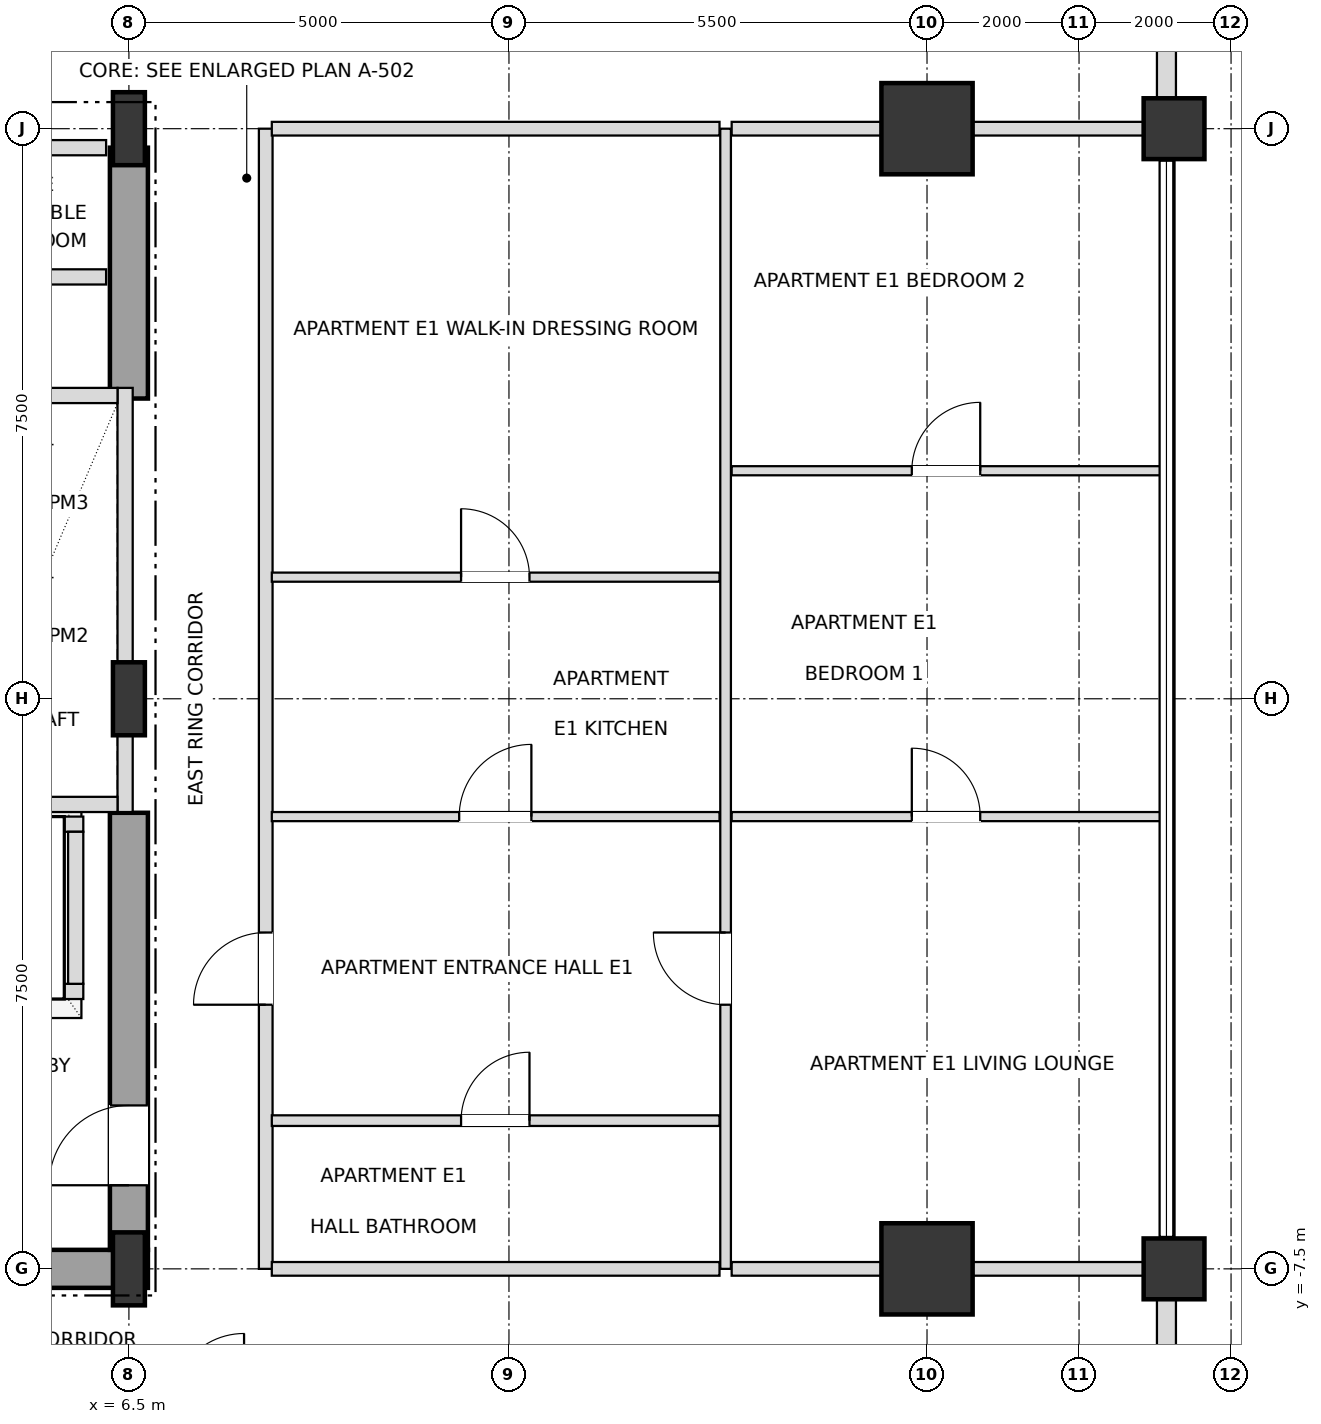
"""IFC4 building model, lengths in metres.
Left out: names, types, materials, properties, quantities, classifications, styles, units other than length and angle.
Written with IfcOpenShell. Run it as: python <this file> out.ifc"""

import sys

from ifc_helpers import new_model, si_unit, direction, frame, frame_2d, origin, origin_2d, place, context, subcontext, project, spatial, rectangle, i_section, extrude, element, fill, save


model = new_model("IFC4")
c1 = context("Model", 3, precision=1e-05, world=origin(), true_north=direction((0.0, 1.0)))
c2 = subcontext(c1, "Body", "Model", "MODEL_VIEW")
j1 = project(units=[si_unit("LENGTHUNIT", "METRE"), si_unit("PLANEANGLEUNIT", "RADIAN")], contexts=[c1])
p1 = place(None, origin())
s1 = spatial("IfcSite", under=j1, at=p1, CompositionType="ELEMENT")
p2 = place(p1, origin())
s2 = spatial("IfcBuilding", under=s1, at=p2, CompositionType="ELEMENT")
p3 = place(p2, frame((0.0, 0.0, 117.0)))
s3 = spatial("IfcBuildingStorey", under=s2, at=p3, CompositionType="ELEMENT", Elevation=117.0)
for number, where, z_axis, x_axis in (
    (1, (6.5, -7.5, 0.0), (0.0, 0.0, 1.0), (1.0, 0.0, 0.0)),
    (2, (6.5, 0.0, 0.0), (0.0, 0.0, 1.0), (1.0, 0.0, 0.0)),
    (3, (6.5, 7.5, 0.0), (0.0, 0.0, 1.0), (1.0, 0.0, 0.0)),
):
    element("IfcColumn", number, at=place(p3, frame(where, z_axis=z_axis, x_axis=x_axis)), inside=s3, PredefinedType="COLUMN", context=c2, shape_type="SweptSolid", body=[
        extrude(i_section(OverallWidth=0.42, OverallDepth=0.96, WebThickness=0.022, FlangeThickness=0.034, at=origin_2d()), origin(), (0.0, 0.0, 1.0), 3.6),
    ])
for number, where, z_axis, x_axis in (
    (4, (17.0, -7.5, 0.0), (0.0, 0.0, 1.0), (1.0, 0.0, 0.0)),
    (5, (17.0, 7.5, 0.0), (0.0, 0.0, 1.0), (1.0, 0.0, 0.0)),
):
    element("IfcColumn", number, at=place(p3, frame(where, z_axis=z_axis, x_axis=x_axis)), inside=s3, PredefinedType="USERDEFINED", context=c2, shape_type="SweptSolid", body=[
        extrude(rectangle(XDim=1.2, YDim=1.2, at=origin_2d()), origin(), (0.0, 0.0, 1.0), 3.6),
    ])
for number, where, z_axis, x_axis in (
    (6, (20.25, -7.5, 0.0), (0.0, 0.0, 1.0), (1.0, 0.0, 0.0)),
    (7, (20.25, 7.5, 0.0), (0.0, 0.0, 1.0), (1.0, 0.0, 0.0)),
):
    element("IfcColumn", number, at=place(p3, frame(where, z_axis=z_axis, x_axis=x_axis)), inside=s3, PredefinedType="COLUMN", context=c2, shape_type="SweptSolid", body=[
        extrude(rectangle(XDim=0.8, YDim=0.8, at=origin_2d()), origin(), (0.0, 0.0, 1.0), 3.6),
    ])
p4 = place(p3, frame((20.15, -12.605, 0.0), z_axis=(0.0, 0.0, 1.0), x_axis=(0.0, 1.0, 0.0)))
e8 = element("IfcWall", 8, at=p4, inside=s3, PredefinedType="SOLIDWALL", context=c2, shape_type="SweptSolid", body=[
    extrude(rectangle(XDim=4.71, YDim=0.25, at=frame_2d((2.355, 0.0))), origin(), (0.0, 0.0, 1.0), 2.656),
])
p5 = place(p4, frame((1.455, 0.0, 0.72)))
e9 = element("IfcOpeningElement", 9, at=p5, cuts=e8, PredefinedType="OPENING", context=c2, shape_type="SweptSolid", body=[
    extrude(rectangle(XDim=1.8, YDim=1.68, at=frame_2d((0.9, 0.84))), frame((0.0, 0.135, 0.0), z_axis=(0.0, -1.0, 0.0), x_axis=(1.0, 0.0, 0.0)), (0.0, 0.0, 1.0), 0.27),
])
p6 = place(p3, frame((20.15, 7.895, 0.0), z_axis=(0.0, 0.0, 1.0), x_axis=(0.0, 1.0, 0.0)))
e10 = element("IfcWall", 10, at=p6, inside=s3, PredefinedType="SOLIDWALL", context=c2, shape_type="SweptSolid", body=[
    extrude(rectangle(XDim=4.71, YDim=0.25, at=frame_2d((2.355, 0.0))), origin(), (0.0, 0.0, 1.0), 2.656),
])
p7 = place(p6, frame((1.455, 0.0, 0.72)))
e11 = element("IfcOpeningElement", 11, at=p7, cuts=e10, PredefinedType="OPENING", context=c2, shape_type="SweptSolid", body=[
    extrude(rectangle(XDim=1.8, YDim=1.68, at=frame_2d((0.9, 0.84))), frame((0.0, 0.135, 0.0), z_axis=(0.0, -1.0, 0.0), x_axis=(1.0, 0.0, 0.0)), (0.0, 0.0, 1.0), 0.27),
])
p8 = place(p3, frame((0.0, -7.5, 0.0), z_axis=(0.0, 0.0, 1.0), x_axis=(1.0, 0.0, 0.0)))
e12 = element("IfcWall", 12, at=p8, inside=s3, PredefinedType="SHEAR", context=c2, shape_type="SweptSolid", body=[
    extrude(rectangle(XDim=6.75, YDim=0.5, at=frame_2d((3.375, 0.0))), origin(), (0.0, 0.0, 1.0), 3.3),
])
p9 = place(p3, frame((6.5, -7.25, 0.0), z_axis=(0.0, 0.0, 1.0), x_axis=(0.0, 1.0, 0.0)))
e13 = element("IfcWall", 13, at=p9, inside=s3, PredefinedType="SHEAR", context=c2, shape_type="SweptSolid", body=[
    extrude(rectangle(XDim=5.75, YDim=0.5, at=frame_2d((2.875, 0.0))), origin(), (0.0, 0.0, 1.0), 3.3),
])
p10 = place(p9, frame((0.85, 0.0, 0.0)))
e14 = element("IfcOpeningElement", 14, at=p10, cuts=e13, PredefinedType="OPENING", context=c2, shape_type="SweptSolid", body=[
    extrude(rectangle(XDim=1.05, YDim=2.15, at=frame_2d((0.525, 1.075))), frame((0.0, 0.26, 0.0), z_axis=(0.0, -1.0, 0.0), x_axis=(1.0, 0.0, 0.0)), (0.0, 0.0, 1.0), 0.52),
])
p11 = place(p3, frame((6.5, 3.95, 0.0), z_axis=(0.0, 0.0, 1.0), x_axis=(0.0, 1.0, 0.0)))
e15 = element("IfcWall", 15, at=p11, inside=s3, PredefinedType="SHEAR", context=c2, shape_type="SweptSolid", body=[
    extrude(rectangle(XDim=3.3, YDim=0.5, at=frame_2d((1.65, 0.0))), origin(), (0.0, 0.0, 1.0), 3.3),
])
p12 = place(p3, frame((6.45, -1.49, 0.0), z_axis=(0.0, 0.0, 1.0), x_axis=(0.0, 1.0, 0.0)))
e16 = element("IfcWall", 16, at=p12, inside=s3, PredefinedType="SOLIDWALL", context=c2, shape_type="SweptSolid", body=[
    extrude(rectangle(XDim=5.58, YDim=0.2, at=frame_2d((2.79, 0.0))), origin(), (0.0, 0.0, 1.0), 2.736),
])
for number, where, z_axis, x_axis in (
    (17, (4.15, -1.39, 0.0), (0.0, 0.0, 1.0), (1.0, 0.0, 0.0)),
    (18, (4.15, 3.99, 0.0), (0.0, 0.0, 1.0), (1.0, 0.0, 0.0)),
):
    element("IfcWall", number, at=place(p3, frame(where, z_axis=z_axis, x_axis=x_axis)), inside=s3, PredefinedType="SOLIDWALL", context=c2, shape_type="SweptSolid", body=[
        extrude(rectangle(XDim=2.2, YDim=0.2, at=frame_2d((1.1, 0.0))), origin(), (0.0, 0.0, 1.0), 3.3),
    ])
p13 = place(p3, frame((1.8, -3.85, 0.0), z_axis=(0.0, 0.0, 1.0), x_axis=(1.0, 0.0, 0.0)))
e19 = element("IfcWall", 19, at=p13, inside=s3, PredefinedType="SOLIDWALL", context=c2, shape_type="SweptSolid", body=[
    extrude(rectangle(XDim=4.1, YDim=0.2, at=frame_2d((2.05, 0.0))), origin(), (0.0, 0.0, 1.0), 3.3),
])
p14 = place(p13, frame((0.45, 0.0, 0.0)))
e20 = element("IfcOpeningElement", 20, at=p14, cuts=e19, PredefinedType="OPENING", context=c2, shape_type="SweptSolid", body=[
    extrude(rectangle(XDim=1.2, YDim=2.2, at=frame_2d((0.6, 1.1))), frame((0.0, 0.11, 0.0), z_axis=(0.0, -1.0, 0.0), x_axis=(1.0, 0.0, 0.0)), (0.0, 0.0, 1.0), 0.22),
])
p15 = place(p13, frame((2.45, 0.0, 0.0)))
e21 = element("IfcOpeningElement", 21, at=p15, cuts=e19, PredefinedType="OPENING", context=c2, shape_type="SweptSolid", body=[
    extrude(rectangle(XDim=1.2, YDim=2.2, at=frame_2d((0.6, 1.1))), frame((0.0, 0.11, 0.0), z_axis=(0.0, -1.0, 0.0), x_axis=(1.0, 0.0, 0.0)), (0.0, 0.0, 1.0), 0.22),
])
p16 = place(p3, frame((1.8, -1.65, 0.0), z_axis=(0.0, 0.0, 1.0), x_axis=(1.0, 0.0, 0.0)))
e22 = element("IfcWall", 22, at=p16, inside=s3, PredefinedType="SOLIDWALL", context=c2, shape_type="SweptSolid", body=[
    extrude(rectangle(XDim=4.1, YDim=0.2, at=frame_2d((2.05, 0.0))), origin(), (0.0, 0.0, 1.0), 3.3),
])
p17 = place(p3, frame((5.8, -3.75, 0.0), z_axis=(0.0, 0.0, 1.0), x_axis=(0.0, 1.0, 0.0)))
e23 = element("IfcWall", 23, at=p17, inside=s3, PredefinedType="SOLIDWALL", context=c2, shape_type="SweptSolid", body=[
    extrude(rectangle(XDim=2.0, YDim=0.2, at=frame_2d((1.0, 0.0))), origin(), (0.0, 0.0, 1.0), 3.3),
])
p18 = place(p3, frame((8.3, -7.5, 0.0), z_axis=(0.0, 0.0, 1.0), x_axis=(0.0, 1.0, 0.0)))
e24 = element("IfcWall", 24, at=p18, inside=s3, PredefinedType="PARTITIONING", context=c2, shape_type="SweptSolid", body=[
    extrude(rectangle(XDim=15.0, YDim=0.18, at=frame_2d((7.5, 0.0))), origin(), (0.0, 0.0, 1.0), 3.3),
])
p19 = place(p18, frame((3.475, 0.0, 0.0)))
e25 = element("IfcOpeningElement", 25, at=p19, cuts=e24, PredefinedType="OPENING", context=c2, shape_type="SweptSolid", body=[
    extrude(rectangle(XDim=0.95, YDim=2.15, at=frame_2d((0.475, 1.075))), frame((0.0, 0.1, 0.0), z_axis=(0.0, -1.0, 0.0), x_axis=(1.0, 0.0, 0.0)), (0.0, 0.0, 1.0), 0.2),
])
p20 = place(p3, frame((14.35, -7.5, 0.0), z_axis=(0.0, 0.0, 1.0), x_axis=(0.0, 1.0, 0.0)))
e26 = element("IfcWall", 26, at=p20, inside=s3, PredefinedType="PARTITIONING", context=c2, shape_type="SweptSolid", body=[
    extrude(rectangle(XDim=15.0, YDim=0.14, at=frame_2d((7.5, 0.0))), origin(), (0.0, 0.0, 1.0), 3.3),
])
p21 = place(p20, frame((3.475, 0.0, 0.0)))
e27 = element("IfcOpeningElement", 27, at=p21, cuts=e26, PredefinedType="OPENING", context=c2, shape_type="SweptSolid", body=[
    extrude(rectangle(XDim=0.95, YDim=2.1, at=frame_2d((0.475, 1.05))), frame((0.0, 0.08, 0.0), z_axis=(0.0, -1.0, 0.0), x_axis=(1.0, 0.0, 0.0)), (0.0, 0.0, 1.0), 0.16),
])
p22 = place(p3, frame((8.38, -7.5, 0.0), z_axis=(0.0, 0.0, 1.0), x_axis=(1.0, 0.0, 0.0)))
e28 = element("IfcWall", 28, at=p22, inside=s3, PredefinedType="PARTITIONING", context=c2, shape_type="SweptSolid", body=[
    extrude(rectangle(XDim=5.89, YDim=0.18, at=frame_2d((2.945, 0.0))), origin(), (0.0, 0.0, 1.0), 2.736),
])
p23 = place(p3, frame((14.43, -7.5, 0.0), z_axis=(0.0, 0.0, 1.0), x_axis=(1.0, 0.0, 0.0)))
e29 = element("IfcWall", 29, at=p23, inside=s3, PredefinedType="PARTITIONING", context=c2, shape_type="SweptSolid", body=[
    extrude(rectangle(XDim=5.72, YDim=0.18, at=frame_2d((2.86, 0.0))), origin(), (0.0, 0.0, 1.0), 2.736),
])
p24 = place(p3, frame((8.38, -5.55, 0.0), z_axis=(0.0, 0.0, 1.0), x_axis=(1.0, 0.0, 0.0)))
e30 = element("IfcWall", 30, at=p24, inside=s3, PredefinedType="PARTITIONING", context=c2, shape_type="SweptSolid", body=[
    extrude(rectangle(XDim=5.89, YDim=0.14, at=frame_2d((2.945, 0.0))), origin(), (0.0, 0.0, 1.0), 3.3),
])
p25 = place(p24, frame((2.49, 0.0, 0.0)))
e31 = element("IfcOpeningElement", 31, at=p25, cuts=e30, PredefinedType="OPENING", context=c2, shape_type="SweptSolid", body=[
    extrude(rectangle(XDim=0.9, YDim=2.1, at=frame_2d((0.45, 1.05))), frame((0.0, 0.08, 0.0), z_axis=(0.0, -1.0, 0.0), x_axis=(1.0, 0.0, 0.0)), (0.0, 0.0, 1.0), 0.16),
])
p26 = place(p3, frame((8.38, -1.55, 0.0), z_axis=(0.0, 0.0, 1.0), x_axis=(1.0, 0.0, 0.0)))
e32 = element("IfcWall", 32, at=p26, inside=s3, PredefinedType="PARTITIONING", context=c2, shape_type="SweptSolid", body=[
    extrude(rectangle(XDim=5.89, YDim=0.12, at=frame_2d((2.945, 0.0))), origin(), (0.0, 0.0, 1.0), 3.3),
])
p27 = place(p26, frame((2.465, 0.0, 0.0)))
e33 = element("IfcOpeningElement", 33, at=p27, cuts=e32, PredefinedType="OPENING", context=c2, shape_type="SweptSolid", body=[
    extrude(rectangle(XDim=0.95, YDim=2.1, at=frame_2d((0.475, 1.05))), frame((0.0, 0.07, 0.0), z_axis=(0.0, -1.0, 0.0), x_axis=(1.0, 0.0, 0.0)), (0.0, 0.0, 1.0), 0.14),
])
p28 = place(p3, frame((14.43, -1.55, 0.0), z_axis=(0.0, 0.0, 1.0), x_axis=(1.0, 0.0, 0.0)))
e34 = element("IfcWall", 34, at=p28, inside=s3, PredefinedType="PARTITIONING", context=c2, shape_type="SweptSolid", body=[
    extrude(rectangle(XDim=5.64, YDim=0.12, at=frame_2d((2.82, 0.0))), origin(), (0.0, 0.0, 1.0), 2.736),
])
p29 = place(p28, frame((2.37, 0.0, 0.0)))
e35 = element("IfcOpeningElement", 35, at=p29, cuts=e34, PredefinedType="OPENING", context=c2, shape_type="SweptSolid", body=[
    extrude(rectangle(XDim=0.9, YDim=2.1, at=frame_2d((0.45, 1.05))), frame((0.0, 0.07, 0.0), z_axis=(0.0, -1.0, 0.0), x_axis=(1.0, 0.0, 0.0)), (0.0, 0.0, 1.0), 0.14),
])
p30 = place(p3, frame((8.38, 1.6, 0.0), z_axis=(0.0, 0.0, 1.0), x_axis=(1.0, 0.0, 0.0)))
e36 = element("IfcWall", 36, at=p30, inside=s3, PredefinedType="PARTITIONING", context=c2, shape_type="SweptSolid", body=[
    extrude(rectangle(XDim=5.89, YDim=0.12, at=frame_2d((2.945, 0.0))), origin(), (0.0, 0.0, 1.0), 3.3),
])
p31 = place(p30, frame((2.49, 0.0, 0.0)))
e37 = element("IfcOpeningElement", 37, at=p31, cuts=e36, PredefinedType="OPENING", context=c2, shape_type="SweptSolid", body=[
    extrude(rectangle(XDim=0.9, YDim=2.1, at=frame_2d((0.45, 1.05))), frame((0.0, 0.07, 0.0), z_axis=(0.0, -1.0, 0.0), x_axis=(1.0, 0.0, 0.0)), (0.0, 0.0, 1.0), 0.14),
])
p32 = place(p3, frame((14.43, 3.0, 0.0), z_axis=(0.0, 0.0, 1.0), x_axis=(1.0, 0.0, 0.0)))
e38 = element("IfcWall", 38, at=p32, inside=s3, PredefinedType="PARTITIONING", context=c2, shape_type="SweptSolid", body=[
    extrude(rectangle(XDim=5.64, YDim=0.12, at=frame_2d((2.82, 0.0))), origin(), (0.0, 0.0, 1.0), 2.736),
])
p33 = place(p32, frame((2.37, 0.0, 0.0)))
e39 = element("IfcOpeningElement", 39, at=p33, cuts=e38, PredefinedType="OPENING", context=c2, shape_type="SweptSolid", body=[
    extrude(rectangle(XDim=0.9, YDim=2.1, at=frame_2d((0.45, 1.05))), frame((0.0, 0.07, 0.0), z_axis=(0.0, -1.0, 0.0), x_axis=(1.0, 0.0, 0.0)), (0.0, 0.0, 1.0), 0.14),
])
for number, where, z_axis, x_axis in (
    (40, (4.13, 5.55, 0.0), (0.0, 0.0, 1.0), (1.0, 0.0, 0.0)),
    (41, (4.13, 7.25, 0.0), (0.0, 0.0, 1.0), (1.0, 0.0, 0.0)),
):
    element("IfcWall", number, at=place(p3, frame(where, z_axis=z_axis, x_axis=x_axis)), inside=s3, PredefinedType="SOLIDWALL", context=c2, shape_type="SweptSolid", body=[
        extrude(rectangle(XDim=2.07, YDim=0.2, at=frame_2d((1.035, 0.0))), origin(), (0.0, 0.0, 1.0), 3.3),
    ])
p34 = place(p3, frame((8.38, 7.5, 0.0), z_axis=(0.0, 0.0, 1.0), x_axis=(1.0, 0.0, 0.0)))
e42 = element("IfcWall", 42, at=p34, inside=s3, PredefinedType="PARTITIONING", context=c2, shape_type="SweptSolid", body=[
    extrude(rectangle(XDim=5.89, YDim=0.18, at=frame_2d((2.945, 0.0))), origin(), (0.0, 0.0, 1.0), 2.736),
])
p35 = place(p3, frame((14.43, 7.5, 0.0), z_axis=(0.0, 0.0, 1.0), x_axis=(1.0, 0.0, 0.0)))
e43 = element("IfcWall", 43, at=p35, inside=s3, PredefinedType="PARTITIONING", context=c2, shape_type="SweptSolid", body=[
    extrude(rectangle(XDim=5.72, YDim=0.18, at=frame_2d((2.86, 0.0))), origin(), (0.0, 0.0, 1.0), 2.736),
])
p36 = place(p10, origin())
e44 = element("IfcDoor", 44, at=p36, inside=s3, OperationType="SINGLE_SWING_LEFT", PredefinedType="DOOR", context=c2, shape_type="SweptSolid", body=[
    extrude(rectangle(XDim=1.05, YDim=2.15, at=frame_2d((0.525, 1.075))), frame((0.0, 0.025, 0.0), z_axis=(0.0, -1.0, 0.0), x_axis=(1.0, 0.0, 0.0)), (0.0, 0.0, 1.0), 0.05),
])
fill(e14, e44)
p37 = place(p25, origin())
e45 = element("IfcDoor", 45, at=p37, inside=s3, OperationType="SINGLE_SWING_RIGHT", PredefinedType="DOOR", context=c2, shape_type="SweptSolid", body=[
    extrude(rectangle(XDim=0.9, YDim=2.1, at=frame_2d((0.45, 1.05))), frame((0.0, 0.025, 0.0), z_axis=(0.0, -1.0, 0.0), x_axis=(1.0, 0.0, 0.0)), (0.0, 0.0, 1.0), 0.05),
])
fill(e31, e45)
p38 = place(p19, origin())
e46 = element("IfcDoor", 46, at=p38, inside=s3, OperationType="SINGLE_SWING_LEFT", PredefinedType="DOOR", context=c2, shape_type="SweptSolid", body=[
    extrude(rectangle(XDim=0.95, YDim=2.15, at=frame_2d((0.475, 1.075))), frame((0.0, 0.025, 0.0), z_axis=(0.0, -1.0, 0.0), x_axis=(1.0, 0.0, 0.0)), (0.0, 0.0, 1.0), 0.05),
])
fill(e25, e46)
p39 = place(p27, origin())
e47 = element("IfcDoor", 47, at=p39, inside=s3, OperationType="SINGLE_SWING_RIGHT", PredefinedType="DOOR", context=c2, shape_type="SweptSolid", body=[
    extrude(rectangle(XDim=0.95, YDim=2.1, at=frame_2d((0.475, 1.05))), frame((0.0, 0.025, 0.0), z_axis=(0.0, -1.0, 0.0), x_axis=(1.0, 0.0, 0.0)), (0.0, 0.0, 1.0), 0.05),
])
fill(e33, e47)
p40 = place(p31, origin())
e48 = element("IfcDoor", 48, at=p40, inside=s3, OperationType="SINGLE_SWING_LEFT", PredefinedType="DOOR", context=c2, shape_type="SweptSolid", body=[
    extrude(rectangle(XDim=0.9, YDim=2.1, at=frame_2d((0.45, 1.05))), frame((0.0, 0.025, 0.0), z_axis=(0.0, -1.0, 0.0), x_axis=(1.0, 0.0, 0.0)), (0.0, 0.0, 1.0), 0.05),
])
fill(e37, e48)
p41 = place(p21, origin())
e49 = element("IfcDoor", 49, at=p41, inside=s3, OperationType="SINGLE_SWING_RIGHT", PredefinedType="DOOR", context=c2, shape_type="SweptSolid", body=[
    extrude(rectangle(XDim=0.95, YDim=2.1, at=frame_2d((0.475, 1.05))), frame((0.0, 0.025, 0.0), z_axis=(0.0, -1.0, 0.0), x_axis=(1.0, 0.0, 0.0)), (0.0, 0.0, 1.0), 0.05),
])
fill(e27, e49)
p42 = place(p29, origin())
e50 = element("IfcDoor", 50, at=p42, inside=s3, OperationType="SINGLE_SWING_LEFT", PredefinedType="DOOR", context=c2, shape_type="SweptSolid", body=[
    extrude(rectangle(XDim=0.9, YDim=2.1, at=frame_2d((0.45, 1.05))), frame((0.0, 0.025, 0.0), z_axis=(0.0, -1.0, 0.0), x_axis=(1.0, 0.0, 0.0)), (0.0, 0.0, 1.0), 0.05),
])
fill(e35, e50)
p43 = place(p33, origin())
e51 = element("IfcDoor", 51, at=p43, inside=s3, OperationType="SINGLE_SWING_RIGHT", PredefinedType="DOOR", context=c2, shape_type="SweptSolid", body=[
    extrude(rectangle(XDim=0.9, YDim=2.1, at=frame_2d((0.45, 1.05))), frame((0.0, 0.025, 0.0), z_axis=(0.0, -1.0, 0.0), x_axis=(1.0, 0.0, 0.0)), (0.0, 0.0, 1.0), 0.05),
])
fill(e39, e51)
save(model, sys.argv[1])
